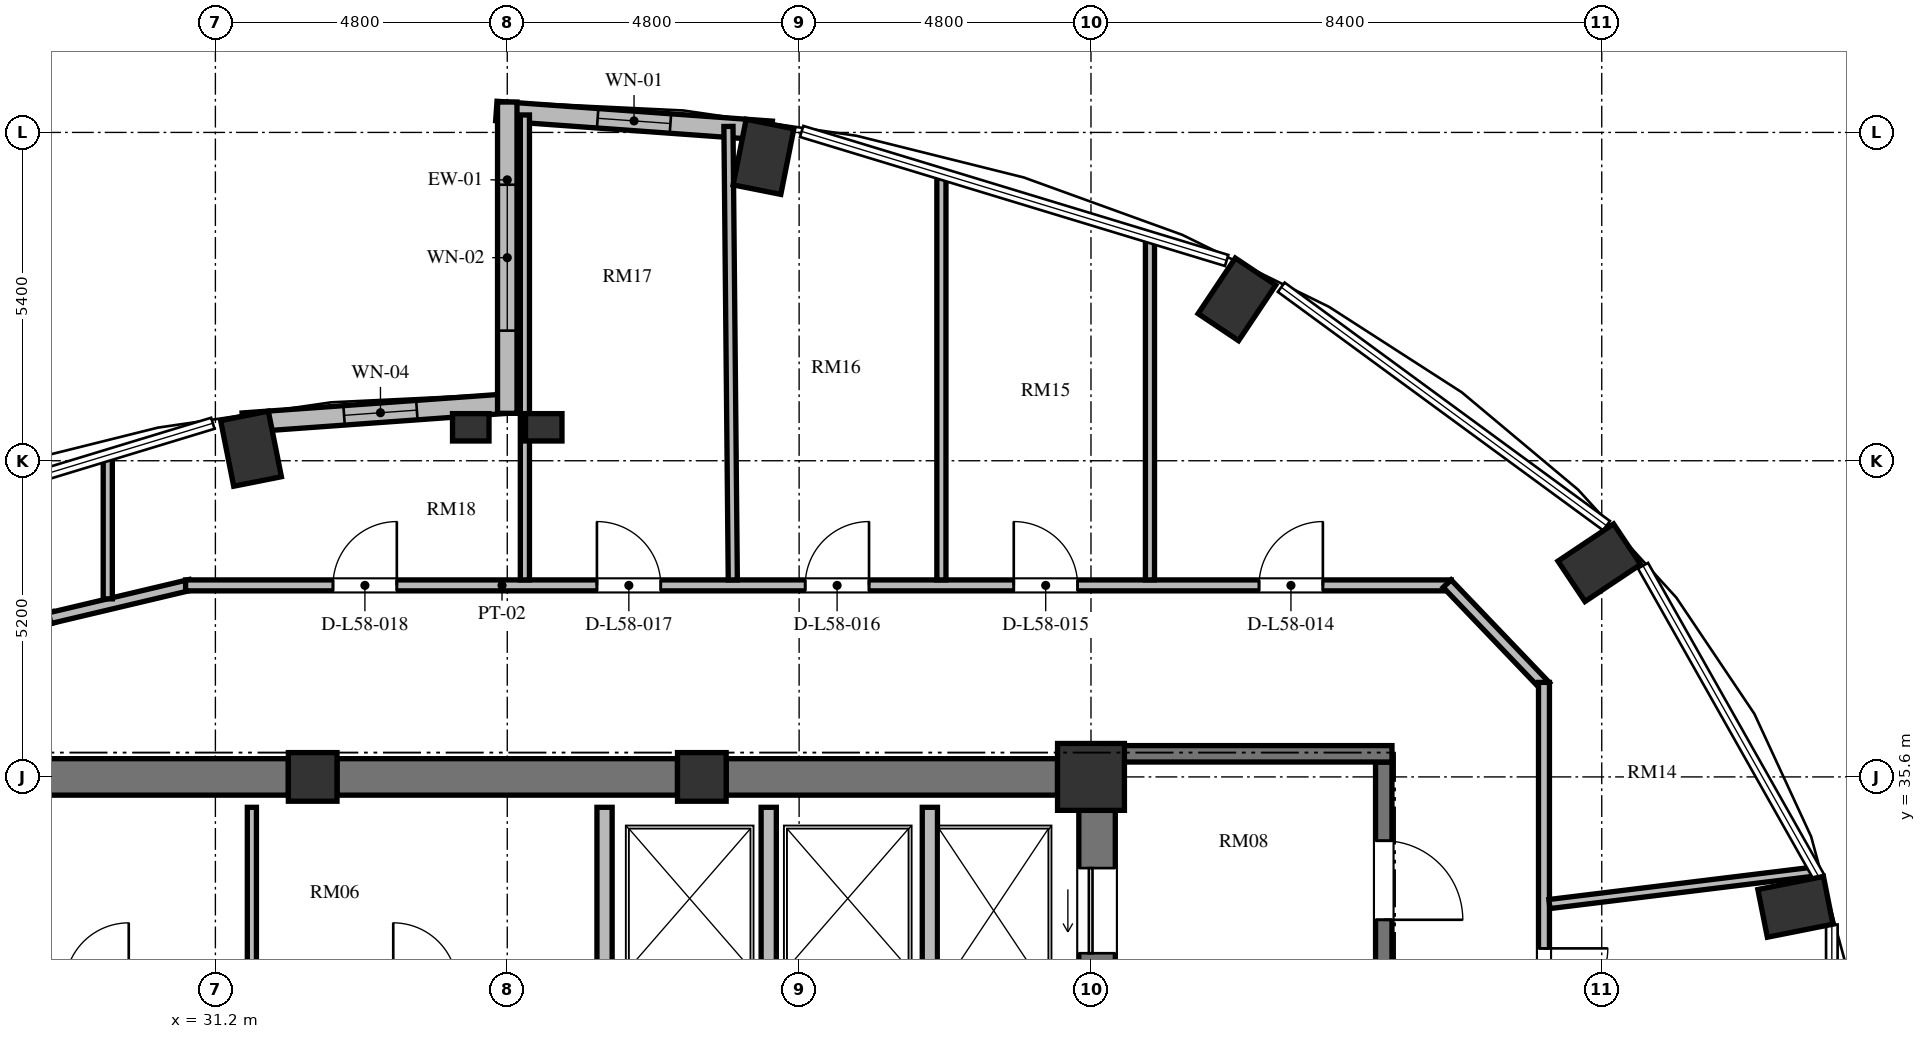
"""IFC4 building model, lengths in metres.
Left out: names, types, materials, properties, quantities, classifications, styles, units other than length and angle.
Written with IfcOpenShell. Run it as: python <this file> out.ifc"""

import sys

from ifc_helpers import new_model, si_unit, direction, frame, frame_2d, origin, origin_2d, place, context, subcontext, project, spatial, rectangle, extrude, element, fill, save


model = new_model("IFC4")
c1 = context("Model", 3, precision=1e-05, world=origin(), true_north=direction((0.0, 1.0)))
c2 = subcontext(c1, "Body", "Model", "MODEL_VIEW")
j1 = project(units=[si_unit("LENGTHUNIT", "METRE"), si_unit("PLANEANGLEUNIT", "RADIAN")], contexts=[c1])
p1 = place(None, origin())
s1 = spatial("IfcSite", under=j1, at=p1, CompositionType="ELEMENT")
p2 = place(p1, origin())
s2 = spatial("IfcBuilding", under=s1, at=p2, CompositionType="ELEMENT")
p3 = place(p2, frame((0.0, 0.0, 224.016)))
s3 = spatial("IfcBuildingStorey", under=s2, at=p3, CompositionType="ELEMENT", Elevation=224.016)
for number, where, z_axis, x_axis in (
    (1, (57.185, 33.463, 0.0), (0.0, 0.0, 1.0), (0.981, 0.195, 0.0)),
    (2, (53.96, 39.123, 0.0), (0.0, 0.0, 1.0), (0.831, 0.556, 0.0)),
    (3, (48.0, 43.454, 0.0), (0.0, 0.0, 1.0), (0.556, 0.831, 0.0)),
    (4, (40.214, 45.798, 0.0), (0.0, 0.0, 1.0), (0.195, 0.981, 0.0)),
    (5, (31.786, 40.998, 0.0), (0.0, 0.0, 1.0), (-0.195, 0.981, 0.0)),
):
    element("IfcColumn", number, at=place(p3, frame(where, z_axis=z_axis, x_axis=x_axis)), inside=s3, PredefinedType="COLUMN", context=c2, shape_type="SweptSolid", body=[
        extrude(rectangle(XDim=1.1, YDim=0.8, at=origin_2d()), origin(), (0.0, 0.0, 1.0), 3.648),
    ])
p4 = place(p3, frame((45.6, 35.6, 0.0), z_axis=(0.0, 0.0, 1.0), x_axis=(1.0, 0.0, 0.0)))
e6 = element("IfcColumn", 6, at=p4, inside=s3, PredefinedType="COLUMN", context=c2, shape_type="SweptSolid", body=[
    extrude(rectangle(XDim=1.1, YDim=1.1, at=origin_2d()), origin(), (0.0, 0.0, 1.0), 3.648),
])
for number, where, z_axis, x_axis in (
    (7, (39.2, 35.6, 0.0), (0.0, 0.0, 1.0), (1.0, 0.0, 0.0)),
    (8, (32.8, 35.6, 0.0), (0.0, 0.0, 1.0), (1.0, 0.0, 0.0)),
):
    element("IfcColumn", number, at=place(p3, frame(where, z_axis=z_axis, x_axis=x_axis)), inside=s3, PredefinedType="COLUMN", context=c2, shape_type="SweptSolid", body=[
        extrude(rectangle(XDim=0.8, YDim=0.8, at=origin_2d()), origin(), (0.0, 0.0, 1.0), 3.648),
    ])
for number, where, z_axis, x_axis in (
    (9, (35.4, 41.35, 0.0), (0.0, 0.0, 1.0), (1.0, 0.0, 0.0)),
    (10, (36.6, 41.35, 0.0), (0.0, 0.0, 1.0), (1.0, 0.0, 0.0)),
):
    element("IfcColumn", number, at=place(p3, frame(where, z_axis=z_axis, x_axis=x_axis)), inside=s3, PredefinedType="PILASTER", context=c2, shape_type="SweptSolid", body=[
        extrude(rectangle(XDim=0.6, YDim=0.45, at=origin_2d()), origin(), (0.0, 0.0, 1.0), 3.648),
    ])
p5 = place(p3, frame((45.7, 20.95, 0.0), z_axis=(0.0, 0.0, 1.0), x_axis=(0.0, 1.0, 0.0)))
e11 = element("IfcWall", 11, at=p5, inside=s3, PredefinedType="SHEAR", context=c2, shape_type="SweptSolid", body=[
    extrude(rectangle(XDim=14.1, YDim=0.6, at=frame_2d((7.05, 0.0))), origin(), (0.0, 0.0, 1.0), 3.648),
])
p6 = place(p5, frame((11.75, 0.0, 0.0)))
e12 = element("IfcOpeningElement", 12, at=p6, cuts=e11, PredefinedType="OPENING", context=c2, shape_type="SweptSolid", body=[
    extrude(rectangle(XDim=1.4, YDim=2.3, at=frame_2d((0.7, 1.15))), frame((0.0, 0.31, 0.0), z_axis=(0.0, -1.0, 0.0), x_axis=(1.0, 0.0, 0.0)), (0.0, 0.0, 1.0), 0.62),
])
p7 = place(p5, frame((0.95, 0.0, 0.0)))
e13 = element("IfcOpeningElement", 13, at=p7, cuts=e11, PredefinedType="OPENING", context=c2, shape_type="SweptSolid", body=[
    extrude(rectangle(XDim=1.4, YDim=2.3, at=frame_2d((0.7, 1.15))), frame((0.0, 0.31, 0.0), z_axis=(0.0, -1.0, 0.0), x_axis=(1.0, 0.0, 0.0)), (0.0, 0.0, 1.0), 0.62),
])
p8 = place(p3, frame((26.95, 35.6, 0.0), z_axis=(0.0, 0.0, 1.0), x_axis=(1.0, 0.0, 0.0)))
e14 = element("IfcWall", 14, at=p8, inside=s3, PredefinedType="SHEAR", context=c2, shape_type="SweptSolid", body=[
    extrude(rectangle(XDim=5.45, YDim=0.6, at=frame_2d((2.725, 0.0))), origin(), (0.0, 0.0, 1.0), 3.648),
])
p9 = place(p3, frame((33.2, 35.6, 0.0), z_axis=(0.0, 0.0, 1.0), x_axis=(1.0, 0.0, 0.0)))
e15 = element("IfcWall", 15, at=p9, inside=s3, PredefinedType="SHEAR", context=c2, shape_type="SweptSolid", body=[
    extrude(rectangle(XDim=5.6, YDim=0.6, at=frame_2d((2.8, 0.0))), origin(), (0.0, 0.0, 1.0), 3.648),
])
p10 = place(p3, frame((39.6, 35.6, 0.0), z_axis=(0.0, 0.0, 1.0), x_axis=(1.0, 0.0, 0.0)))
e16 = element("IfcWall", 16, at=p10, inside=s3, PredefinedType="SHEAR", context=c2, shape_type="SweptSolid", body=[
    extrude(rectangle(XDim=5.45, YDim=0.6, at=frame_2d((2.725, 0.0))), origin(), (0.0, 0.0, 1.0), 3.648),
])
p11 = place(p3, frame((40.35, 46.226, 0.0), z_axis=(0.0, 0.0, 1.0), x_axis=(-0.997409061056, 0.071938619141, 0.0)))
e17 = element("IfcWall", 17, at=p11, inside=s3, PredefinedType="SOLIDWALL", context=c2, shape_type="SweptSolid", body=[
    extrude(rectangle(XDim=4.541, YDim=0.32, at=frame_2d((2.271, 0.0))), origin(), (0.0, 0.0, 1.0), 3.448),
])
p12 = place(p11, frame((1.67, 0.0, 0.85)))
e18 = element("IfcOpeningElement", 18, at=p12, cuts=e17, PredefinedType="OPENING", context=c2, shape_type="SweptSolid", body=[
    extrude(rectangle(XDim=1.2, YDim=2.2, at=frame_2d((0.6, 1.1))), frame((0.0, 0.17, 0.0), z_axis=(0.0, -1.0, 0.0), x_axis=(1.0, 0.0, 0.0)), (0.0, 0.0, 1.0), 0.34),
])
p13 = place(p3, frame((36.179, 41.753, 0.0), z_axis=(0.0, 0.0, 1.0), x_axis=(-0.997408782787, -0.071942477163, 0.0)))
e19 = element("IfcWall", 19, at=p13, inside=s3, PredefinedType="SOLIDWALL", context=c2, shape_type="SweptSolid", body=[
    extrude(rectangle(XDim=4.541, YDim=0.32, at=frame_2d((2.27, 0.0))), origin(), (0.0, 0.0, 1.0), 3.448),
])
p14 = place(p13, frame((1.67, 0.0, 0.85)))
e20 = element("IfcOpeningElement", 20, at=p14, cuts=e19, PredefinedType="OPENING", context=c2, shape_type="SweptSolid", body=[
    extrude(rectangle(XDim=1.2, YDim=1.8, at=frame_2d((0.6, 0.9))), frame((0.0, 0.17, 0.0), z_axis=(0.0, -1.0, 0.0), x_axis=(1.0, 0.0, 0.0)), (0.0, 0.0, 1.0), 0.34),
])
p15 = place(p3, frame((36.0, 46.7, 0.0), z_axis=(0.0, 0.0, 1.0), x_axis=(0.0, -1.0, 0.0)))
e21 = element("IfcWall", 21, at=p15, inside=s3, PredefinedType="SOLIDWALL", context=c2, shape_type="SweptSolid", body=[
    extrude(rectangle(XDim=5.12, YDim=0.32, at=frame_2d((2.56, 0.0))), origin(), (0.0, 0.0, 1.0), 3.448),
])
p16 = place(p15, frame((1.36, 0.0, 0.84)))
e22 = element("IfcOpeningElement", 22, at=p16, cuts=e21, PredefinedType="OPENING", context=c2, shape_type="SweptSolid", body=[
    extrude(rectangle(XDim=2.4, YDim=2.04, at=frame_2d((1.2, 1.02))), frame((0.0, 0.17, 0.0), z_axis=(0.0, -1.0, 0.0), x_axis=(1.0, 0.0, 0.0)), (0.0, 0.0, 1.0), 0.34),
])
p17 = place(p3, frame((42.95, 31.92, 0.0), z_axis=(0.0, 0.0, 1.0), x_axis=(0.0, 1.0, 0.0)))
e23 = element("IfcWall", 23, at=p17, inside=s3, PredefinedType="SOLIDWALL", context=c2, shape_type="SweptSolid", body=[
    extrude(rectangle(XDim=3.18, YDim=0.25, at=frame_2d((1.59, 0.0))), origin(), (0.0, 0.0, 1.0), 3.448),
])
for number, where, z_axis, x_axis in (
    (24, (37.6, 32.42, 0.0), (0.0, 0.0, 1.0), (0.0, 1.0, 0.0)),
    (25, (40.3, 32.42, 0.0), (0.0, 0.0, 1.0), (0.0, 1.0, 0.0)),
):
    element("IfcWall", number, at=place(p3, frame(where, z_axis=z_axis, x_axis=x_axis)), inside=s3, PredefinedType="SOLIDWALL", context=c2, shape_type="SweptSolid", body=[
        extrude(rectangle(XDim=2.68, YDim=0.25, at=frame_2d((1.34, 0.0))), origin(), (0.0, 0.0, 1.0), 3.448),
    ])
p18 = place(p3, frame((31.8, 32.42, 0.0), z_axis=(0.0, 0.0, 1.0), x_axis=(0.0, 1.0, 0.0)))
e26 = element("IfcWall", 26, at=p18, inside=s3, PredefinedType="PARTITIONING", context=c2, shape_type="SweptSolid", body=[
    extrude(rectangle(XDim=2.68, YDim=0.15, at=frame_2d((1.34, 0.0))), origin(), (0.0, 0.0, 1.0), 3.448),
])
p19 = place(p3, frame((50.415, 35.845, 0.0), z_axis=(0.0, 0.0, 1.0), x_axis=(0.0, -1.0, 0.0)))
e27 = element("IfcWall", 27, at=p19, inside=s3, PredefinedType="SHEAR", context=c2, shape_type="SweptSolid", body=[
    extrude(rectangle(XDim=15.825, YDim=0.27, at=frame_2d((7.913, 0.0))), origin(), (0.0, 0.0, 1.0), 3.648),
])
p20 = place(p19, frame((4.445, 0.0, 0.0)))
e28 = element("IfcOpeningElement", 28, at=p20, cuts=e27, PredefinedType="OPENING", context=c2, shape_type="SweptSolid", body=[
    extrude(rectangle(XDim=1.2, YDim=2.15, at=frame_2d((0.6, 1.075))), frame((0.0, 0.145, 0.0), z_axis=(0.0, -1.0, 0.0), x_axis=(1.0, 0.0, 0.0)), (0.0, 0.0, 1.0), 0.29),
])
p21 = place(p19, frame((1.295, 0.0, 0.0)))
e29 = element("IfcOpeningElement", 29, at=p21, cuts=e27, PredefinedType="OPENING", context=c2, shape_type="SweptSolid", body=[
    extrude(rectangle(XDim=1.3, YDim=2.2, at=frame_2d((0.65, 1.1))), frame((0.0, 0.145, 0.0), z_axis=(0.0, -1.0, 0.0), x_axis=(1.0, 0.0, 0.0)), (0.0, 0.0, 1.0), 0.29),
])
p22 = place(p19, frame((13.095, 0.0, 0.0)))
e30 = element("IfcOpeningElement", 30, at=p22, cuts=e27, PredefinedType="OPENING", context=c2, shape_type="SweptSolid", body=[
    extrude(rectangle(XDim=1.3, YDim=2.2, at=frame_2d((0.65, 1.1))), frame((0.0, 0.145, 0.0), z_axis=(0.0, -1.0, 0.0), x_axis=(1.0, 0.0, 0.0)), (0.0, 0.0, 1.0), 0.29),
])
p23 = place(p3, frame((46.0, 35.98, 0.0), z_axis=(0.0, 0.0, 1.0), x_axis=(1.0, 0.0, 0.0)))
e31 = element("IfcWall", 31, at=p23, inside=s3, PredefinedType="SHEAR", context=c2, shape_type="SweptSolid", body=[
    extrude(rectangle(XDim=4.55, YDim=0.27, at=frame_2d((2.275, 0.0))), origin(), (0.0, 0.0, 1.0), 3.648),
])
p24 = place(p3, frame((23.294, 36.422, 0.0), z_axis=(0.0, 0.0, 1.0), x_axis=(0.945493277461, 0.325641616316, 0.0)))
e32 = element("IfcWall", 32, at=p24, inside=s3, PredefinedType="PARTITIONING", context=c2, shape_type="SweptSolid", body=[
    extrude(rectangle(XDim=5.562, YDim=0.18, at=frame_2d((2.781, 0.0))), origin(), (0.0, 0.0, 1.0), 3.073),
])
p25 = place(p3, frame((28.476, 38.211, 0.0), z_axis=(0.0, 0.0, 1.0), x_axis=(0.973030562203, 0.230676234189, 0.0)))
e33 = element("IfcWall", 33, at=p25, inside=s3, PredefinedType="PARTITIONING", context=c2, shape_type="SweptSolid", body=[
    extrude(rectangle(XDim=2.377, YDim=0.18, at=frame_2d((1.188, 0.0))), origin(), (0.0, 0.0, 1.0), 3.448),
])
p26 = place(p3, frame((30.71, 38.75, 0.0), z_axis=(0.0, 0.0, 1.0), x_axis=(1.0, 0.0, 0.0)))
e34 = element("IfcWall", 34, at=p26, inside=s3, PredefinedType="PARTITIONING", context=c2, shape_type="SweptSolid", body=[
    extrude(rectangle(XDim=20.815, YDim=0.18, at=frame_2d((10.408, 0.0))), origin(), (0.0, 0.0, 1.0), 3.073),
])
p27 = place(p26, frame((17.654, 0.0, 0.0)))
e35 = element("IfcOpeningElement", 35, at=p27, cuts=e34, PredefinedType="OPENING", context=c2, shape_type="SweptSolid", body=[
    extrude(rectangle(XDim=1.05, YDim=2.15, at=frame_2d((0.525, 1.075))), frame((0.0, 0.1, 0.0), z_axis=(0.0, -1.0, 0.0), x_axis=(1.0, 0.0, 0.0)), (0.0, 0.0, 1.0), 0.2),
])
p28 = place(p26, frame((13.62, 0.0, 0.0)))
e36 = element("IfcOpeningElement", 36, at=p28, cuts=e34, PredefinedType="OPENING", context=c2, shape_type="SweptSolid", body=[
    extrude(rectangle(XDim=1.05, YDim=2.15, at=frame_2d((0.525, 1.075))), frame((0.0, 0.1, 0.0), z_axis=(0.0, -1.0, 0.0), x_axis=(1.0, 0.0, 0.0)), (0.0, 0.0, 1.0), 0.2),
])
p29 = place(p26, frame((10.19, 0.0, 0.0)))
e37 = element("IfcOpeningElement", 37, at=p29, cuts=e34, PredefinedType="OPENING", context=c2, shape_type="SweptSolid", body=[
    extrude(rectangle(XDim=1.05, YDim=2.15, at=frame_2d((0.525, 1.075))), frame((0.0, 0.1, 0.0), z_axis=(0.0, -1.0, 0.0), x_axis=(1.0, 0.0, 0.0)), (0.0, 0.0, 1.0), 0.2),
])
p30 = place(p26, frame((6.765, 0.0, 0.0)))
e38 = element("IfcOpeningElement", 38, at=p30, cuts=e34, PredefinedType="OPENING", context=c2, shape_type="SweptSolid", body=[
    extrude(rectangle(XDim=1.05, YDim=2.15, at=frame_2d((0.525, 1.075))), frame((0.0, 0.1, 0.0), z_axis=(0.0, -1.0, 0.0), x_axis=(1.0, 0.0, 0.0)), (0.0, 0.0, 1.0), 0.2),
])
p31 = place(p26, frame((2.424, 0.0, 0.0)))
e39 = element("IfcOpeningElement", 39, at=p31, cuts=e34, PredefinedType="OPENING", context=c2, shape_type="SweptSolid", body=[
    extrude(rectangle(XDim=1.05, YDim=2.15, at=frame_2d((0.525, 1.075))), frame((0.0, 0.1, 0.0), z_axis=(0.0, -1.0, 0.0), x_axis=(1.0, 0.0, 0.0)), (0.0, 0.0, 1.0), 0.2),
])
p32 = place(p3, frame((51.458, 38.779, 0.0), z_axis=(0.0, 0.0, 1.0), x_axis=(0.691359830363, -0.722510612352, 0.0)))
e40 = element("IfcWall", 40, at=p32, inside=s3, PredefinedType="PARTITIONING", context=c2, shape_type="SweptSolid", body=[
    extrude(rectangle(XDim=2.343, YDim=0.18, at=frame_2d((1.172, 0.0))), origin(), (0.0, 0.0, 1.0), 3.033),
])
p33 = place(p3, frame((53.05, 37.155, 0.0), z_axis=(0.0, 0.0, 1.0), x_axis=(0.0, -1.0, 0.0)))
e41 = element("IfcWall", 41, at=p33, inside=s3, PredefinedType="PARTITIONING", context=c2, shape_type="SweptSolid", body=[
    extrude(rectangle(XDim=13.509, YDim=0.18, at=frame_2d((6.754, 0.0))), origin(), (0.0, 0.0, 1.0), 3.448),
])
p34 = place(p33, frame((10.398, 0.0, 0.0)))
e42 = element("IfcOpeningElement", 42, at=p34, cuts=e41, PredefinedType="OPENING", context=c2, shape_type="SweptSolid", body=[
    extrude(rectangle(XDim=1.05, YDim=2.15, at=frame_2d((0.525, 1.075))), frame((0.0, 0.1, 0.0), z_axis=(0.0, -1.0, 0.0), x_axis=(1.0, 0.0, 0.0)), (0.0, 0.0, 1.0), 0.2),
])
p35 = place(p33, frame((6.705, 0.0, 0.0)))
e43 = element("IfcOpeningElement", 43, at=p35, cuts=e41, PredefinedType="OPENING", context=c2, shape_type="SweptSolid", body=[
    extrude(rectangle(XDim=1.4, YDim=2.2, at=frame_2d((0.7, 1.1))), frame((0.0, 0.1, 0.0), z_axis=(0.0, -1.0, 0.0), x_axis=(1.0, 0.0, 0.0)), (0.0, 0.0, 1.0), 0.2),
])
p36 = place(p33, frame((4.375, 0.0, 0.0)))
e44 = element("IfcOpeningElement", 44, at=p36, cuts=e41, PredefinedType="OPENING", context=c2, shape_type="SweptSolid", body=[
    extrude(rectangle(XDim=1.05, YDim=2.15, at=frame_2d((0.525, 1.075))), frame((0.0, 0.1, 0.0), z_axis=(0.0, -1.0, 0.0), x_axis=(1.0, 0.0, 0.0)), (0.0, 0.0, 1.0), 0.2),
])
p37 = place(p3, frame((53.139, 33.509, 0.0), z_axis=(0.0, 0.0, 1.0), x_axis=(0.992571001818, 0.121666784083, 0.0)))
e45 = element("IfcWall", 45, at=p37, inside=s3, PredefinedType="PARTITIONING", context=c2, shape_type="SweptSolid", body=[
    extrude(rectangle(XDim=4.417, YDim=0.15, at=frame_2d((2.208, 0.0))), origin(), (0.0, 0.0, 1.0), 3.448),
])
p38 = place(p3, frame((29.43, 38.529, 0.0), z_axis=(0.0, 0.0, 1.0), x_axis=(0.0, 1.0, 0.0)))
e46 = element("IfcWall", 46, at=p38, inside=s3, PredefinedType="PARTITIONING", context=c2, shape_type="SweptSolid", body=[
    extrude(rectangle(XDim=2.346, YDim=0.15, at=frame_2d((1.173, 0.0))), origin(), (0.0, 0.0, 1.0), 3.448),
])
p39 = place(p3, frame((36.29, 38.84, 0.0), z_axis=(0.0, 0.0, 1.0), x_axis=(0.0, 1.0, 0.0)))
e47 = element("IfcWall", 47, at=p39, inside=s3, PredefinedType="PARTITIONING", context=c2, shape_type="SweptSolid", body=[
    extrude(rectangle(XDim=7.647, YDim=0.15, at=frame_2d((3.824, 0.0))), origin(), (0.0, 0.0, 1.0), 3.448),
])
p40 = place(p3, frame((39.709, 38.84, 0.0), z_axis=(0.0, 0.0, 1.0), x_axis=(-0.009590393625, 0.999954011118, 0.0)))
e48 = element("IfcWall", 48, at=p40, inside=s3, PredefinedType="PARTITIONING", context=c2, shape_type="SweptSolid", body=[
    extrude(rectangle(XDim=7.459, YDim=0.15, at=frame_2d((3.729, 0.0))), origin(), (0.0, 0.0, 1.0), 2.933),
])
p41 = place(p3, frame((43.14, 38.84, 0.0), z_axis=(0.0, 0.0, 1.0), x_axis=(0.0, 1.0, 0.0)))
e49 = element("IfcWall", 49, at=p41, inside=s3, PredefinedType="PARTITIONING", context=c2, shape_type="SweptSolid", body=[
    extrude(rectangle(XDim=6.662, YDim=0.15, at=frame_2d((3.331, 0.0))), origin(), (0.0, 0.0, 1.0), 3.448),
])
p42 = place(p3, frame((46.57, 38.84, 0.0), z_axis=(0.0, 0.0, 1.0), x_axis=(0.0, 1.0, 0.0)))
e50 = element("IfcWall", 50, at=p42, inside=s3, PredefinedType="PARTITIONING", context=c2, shape_type="SweptSolid", body=[
    extrude(rectangle(XDim=5.62, YDim=0.15, at=frame_2d((2.81, 0.0))), origin(), (0.0, 0.0, 1.0), 3.448),
])
p43 = place(p12, origin())
e51 = element("IfcWindow", 51, at=p43, inside=s3, PartitioningType="SINGLE_PANEL", PredefinedType="WINDOW", context=c2, shape_type="SweptSolid", body=[
    extrude(rectangle(XDim=1.2, YDim=2.2, at=frame_2d((0.6, 1.1))), frame((0.0, 0.03, 0.0), z_axis=(0.0, -1.0, 0.0), x_axis=(1.0, 0.0, 0.0)), (0.0, 0.0, 1.0), 0.06),
])
fill(e18, e51)
p44 = place(p14, origin())
e52 = element("IfcWindow", 52, at=p44, inside=s3, PartitioningType="SINGLE_PANEL", PredefinedType="WINDOW", context=c2, shape_type="SweptSolid", body=[
    extrude(rectangle(XDim=1.2, YDim=1.8, at=frame_2d((0.6, 0.9))), frame((0.0, 0.03, 0.0), z_axis=(0.0, -1.0, 0.0), x_axis=(1.0, 0.0, 0.0)), (0.0, 0.0, 1.0), 0.06),
])
fill(e20, e52)
p45 = place(p16, origin())
e53 = element("IfcWindow", 53, at=p45, inside=s3, PartitioningType="SINGLE_PANEL", PredefinedType="WINDOW", context=c2, shape_type="SweptSolid", body=[
    extrude(rectangle(XDim=2.4, YDim=2.04, at=frame_2d((1.2, 1.02))), frame((0.0, 0.03, 0.0), z_axis=(0.0, -1.0, 0.0), x_axis=(1.0, 0.0, 0.0)), (0.0, 0.0, 1.0), 0.06),
])
fill(e22, e53)
p46 = place(p6, origin())
e54 = element("IfcDoor", 54, at=p46, inside=s3, OperationType="SLIDING_TO_LEFT", PredefinedType="DOOR", context=c2, shape_type="SweptSolid", body=[
    extrude(rectangle(XDim=1.4, YDim=2.3, at=frame_2d((0.7, 1.15))), frame((0.0, 0.025, 0.0), z_axis=(0.0, -1.0, 0.0), x_axis=(1.0, 0.0, 0.0)), (0.0, 0.0, 1.0), 0.05),
])
fill(e12, e54)
p47 = place(p21, origin())
e55 = element("IfcDoor", 55, at=p47, inside=s3, OperationType="SINGLE_SWING_RIGHT", PredefinedType="DOOR", context=c2, shape_type="SweptSolid", body=[
    extrude(rectangle(XDim=1.3, YDim=2.2, at=frame_2d((0.65, 1.1))), frame((0.0, 0.025, 0.0), z_axis=(0.0, -1.0, 0.0), x_axis=(1.0, 0.0, 0.0)), (0.0, 0.0, 1.0), 0.05),
])
fill(e29, e55)
p48 = place(p36, origin())
e56 = element("IfcDoor", 56, at=p48, inside=s3, OperationType="SINGLE_SWING_LEFT", PredefinedType="DOOR", context=c2, shape_type="SweptSolid", body=[
    extrude(rectangle(XDim=1.05, YDim=2.15, at=frame_2d((0.525, 1.075))), frame((0.0, 0.025, 0.0), z_axis=(0.0, -1.0, 0.0), x_axis=(1.0, 0.0, 0.0)), (0.0, 0.0, 1.0), 0.05),
])
fill(e44, e56)
p49 = place(p27, origin())
e57 = element("IfcDoor", 57, at=p49, inside=s3, OperationType="SINGLE_SWING_RIGHT", PredefinedType="DOOR", context=c2, shape_type="SweptSolid", body=[
    extrude(rectangle(XDim=1.05, YDim=2.15, at=frame_2d((0.525, 1.075))), frame((0.0, 0.025, 0.0), z_axis=(0.0, -1.0, 0.0), x_axis=(1.0, 0.0, 0.0)), (0.0, 0.0, 1.0), 0.05),
])
fill(e35, e57)
p50 = place(p28, origin())
e58 = element("IfcDoor", 58, at=p50, inside=s3, OperationType="SINGLE_SWING_LEFT", PredefinedType="DOOR", context=c2, shape_type="SweptSolid", body=[
    extrude(rectangle(XDim=1.05, YDim=2.15, at=frame_2d((0.525, 1.075))), frame((0.0, 0.025, 0.0), z_axis=(0.0, -1.0, 0.0), x_axis=(1.0, 0.0, 0.0)), (0.0, 0.0, 1.0), 0.05),
])
fill(e36, e58)
p51 = place(p29, origin())
e59 = element("IfcDoor", 59, at=p51, inside=s3, OperationType="SINGLE_SWING_RIGHT", PredefinedType="DOOR", context=c2, shape_type="SweptSolid", body=[
    extrude(rectangle(XDim=1.05, YDim=2.15, at=frame_2d((0.525, 1.075))), frame((0.0, 0.025, 0.0), z_axis=(0.0, -1.0, 0.0), x_axis=(1.0, 0.0, 0.0)), (0.0, 0.0, 1.0), 0.05),
])
fill(e37, e59)
p52 = place(p30, origin())
e60 = element("IfcDoor", 60, at=p52, inside=s3, OperationType="SINGLE_SWING_LEFT", PredefinedType="DOOR", context=c2, shape_type="SweptSolid", body=[
    extrude(rectangle(XDim=1.05, YDim=2.15, at=frame_2d((0.525, 1.075))), frame((0.0, 0.025, 0.0), z_axis=(0.0, -1.0, 0.0), x_axis=(1.0, 0.0, 0.0)), (0.0, 0.0, 1.0), 0.05),
])
fill(e38, e60)
p53 = place(p31, origin())
e61 = element("IfcDoor", 61, at=p53, inside=s3, OperationType="SINGLE_SWING_RIGHT", PredefinedType="DOOR", context=c2, shape_type="SweptSolid", body=[
    extrude(rectangle(XDim=1.05, YDim=2.15, at=frame_2d((0.525, 1.075))), frame((0.0, 0.025, 0.0), z_axis=(0.0, -1.0, 0.0), x_axis=(1.0, 0.0, 0.0)), (0.0, 0.0, 1.0), 0.05),
])
fill(e39, e61)
save(model, sys.argv[1])
